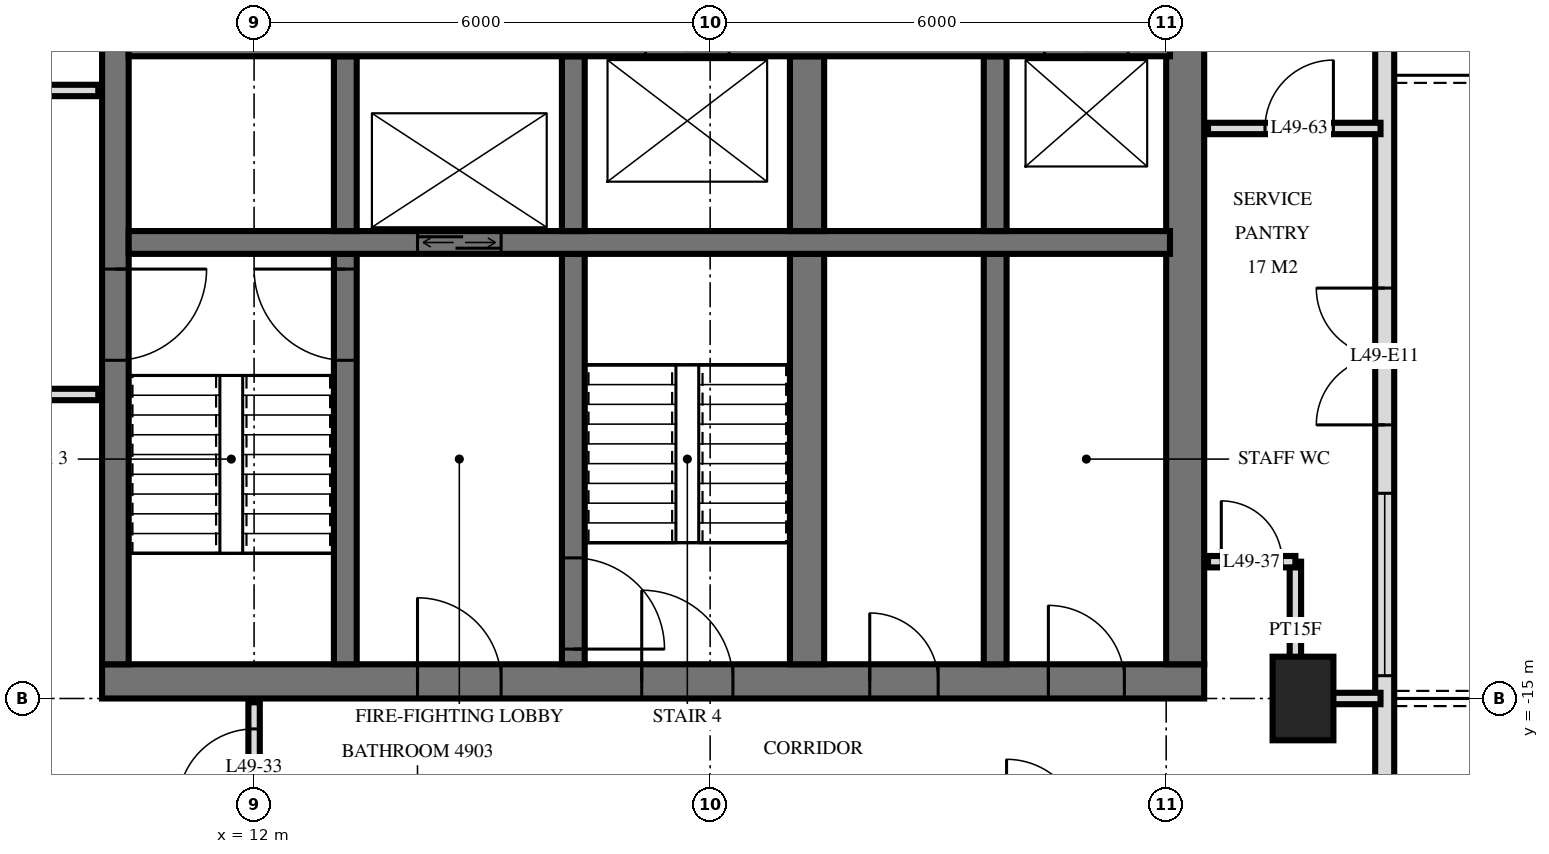
"""IFC4 building model, lengths in metres.
Left out: names, types, materials, properties, quantities, classifications, styles, units other than length and angle.
Written with IfcOpenShell. Run it as: python <this file> out.ifc"""

import sys

from ifc_helpers import new_model, si_unit, direction, frame, frame_2d, origin, origin_2d, place, context, subcontext, project, spatial, rectangle, extrude, element, fill, save


model = new_model("IFC4")
c1 = context("Model", 3, precision=1e-05, world=origin(), true_north=direction((0.0, 1.0)))
c2 = subcontext(c1, "Body", "Model", "MODEL_VIEW")
j1 = project(units=[si_unit("LENGTHUNIT", "METRE"), si_unit("PLANEANGLEUNIT", "RADIAN")], contexts=[c1])
p1 = place(None, origin())
s1 = spatial("IfcSite", under=j1, at=p1, CompositionType="ELEMENT")
p2 = place(p1, origin())
s2 = spatial("IfcBuilding", under=s1, at=p2, CompositionType="ELEMENT")
p3 = place(p2, frame((0.0, 0.0, 190.6)))
s3 = spatial("IfcBuildingStorey", under=s2, at=p3, CompositionType="ELEMENT", Elevation=190.6)
p4 = place(p3, frame((25.8, -15.0, 0.0), z_axis=(0.0, 0.0, 1.0), x_axis=(0.0, 1.0, 0.0)))
e1 = element("IfcColumn", 1, at=p4, inside=s3, PredefinedType="COLUMN", context=c2, shape_type="SweptSolid", body=[
    extrude(rectangle(XDim=1.1, YDim=0.8, at=origin_2d()), origin(), (0.0, 0.0, 1.0), 3.5),
])
p5 = place(p3, frame((10.0, -14.775, 0.0), z_axis=(0.0, 0.0, 1.0), x_axis=(1.0, 0.0, 0.0)))
e2 = element("IfcWall", 2, at=p5, inside=s3, PredefinedType="SHEAR", context=c2, shape_type="SweptSolid", body=[
    extrude(rectangle(XDim=14.5, YDim=0.45, at=frame_2d((7.25, 0.0))), origin(), (0.0, 0.0, 1.0), 3.5),
])
p6 = place(p5, frame((7.1, 0.0, 0.0)))
e3 = element("IfcOpeningElement", 3, at=p6, cuts=e2, PredefinedType="OPENING", context=c2, shape_type="SweptSolid", body=[
    extrude(rectangle(XDim=1.2, YDim=2.1, at=frame_2d((0.6, 1.05))), frame((0.0, 0.235, 0.0), z_axis=(0.0, -1.0, 0.0), x_axis=(1.0, 0.0, 0.0)), (0.0, 0.0, 1.0), 0.47),
])
p7 = place(p5, frame((4.15, 0.0, 0.0)))
e4 = element("IfcOpeningElement", 4, at=p7, cuts=e2, PredefinedType="OPENING", context=c2, shape_type="SweptSolid", body=[
    extrude(rectangle(XDim=1.1, YDim=2.1, at=frame_2d((0.55, 1.05))), frame((0.0, 0.235, 0.0), z_axis=(0.0, -1.0, 0.0), x_axis=(1.0, 0.0, 0.0)), (0.0, 0.0, 1.0), 0.47),
])
p8 = place(p5, frame((10.1, 0.0, 0.0)))
e5 = element("IfcOpeningElement", 5, at=p8, cuts=e2, PredefinedType="OPENING", context=c2, shape_type="SweptSolid", body=[
    extrude(rectangle(XDim=0.9, YDim=2.1, at=frame_2d((0.45, 1.05))), frame((0.0, 0.235, 0.0), z_axis=(0.0, -1.0, 0.0), x_axis=(1.0, 0.0, 0.0)), (0.0, 0.0, 1.0), 0.47),
])
p9 = place(p5, frame((12.45, 0.0, 0.0)))
e6 = element("IfcOpeningElement", 6, at=p9, cuts=e2, PredefinedType="OPENING", context=c2, shape_type="SweptSolid", body=[
    extrude(rectangle(XDim=1.0, YDim=2.1, at=frame_2d((0.5, 1.05))), frame((0.0, 0.235, 0.0), z_axis=(0.0, -1.0, 0.0), x_axis=(1.0, 0.0, 0.0)), (0.0, 0.0, 1.0), 0.47),
])
p10 = place(p3, frame((10.175, -14.55, 0.0), z_axis=(0.0, 0.0, 1.0), x_axis=(0.0, 1.0, 0.0)))
e7 = element("IfcWall", 7, at=p10, inside=s3, PredefinedType="SHEAR", context=c2, shape_type="SweptSolid", body=[
    extrude(rectangle(XDim=14.1, YDim=0.35, at=frame_2d((7.05, 0.0))), origin(), (0.0, 0.0, 1.0), 3.5),
])
p11 = place(p10, frame((8.4, 0.0, 0.0)))
e8 = element("IfcOpeningElement", 8, at=p11, cuts=e7, PredefinedType="OPENING", context=c2, shape_type="SweptSolid", body=[
    extrude(rectangle(XDim=1.4, YDim=2.4, at=frame_2d((0.7, 1.2))), frame((0.0, 0.185, 0.0), z_axis=(0.0, -1.0, 0.0), x_axis=(1.0, 0.0, 0.0)), (0.0, 0.0, 1.0), 0.37),
])
p12 = place(p10, frame((10.0, 0.0, 0.0)))
e9 = element("IfcOpeningElement", 9, at=p12, cuts=e7, PredefinedType="OPENING", context=c2, shape_type="SweptSolid", body=[
    extrude(rectangle(XDim=1.4, YDim=2.4, at=frame_2d((0.7, 1.2))), frame((0.0, 0.185, 0.0), z_axis=(0.0, -1.0, 0.0), x_axis=(1.0, 0.0, 0.0)), (0.0, 0.0, 1.0), 0.37),
])
p13 = place(p10, frame((4.0, 0.0, 0.0)))
e10 = element("IfcOpeningElement", 10, at=p13, cuts=e7, PredefinedType="OPENING", context=c2, shape_type="SweptSolid", body=[
    extrude(rectangle(XDim=1.2, YDim=2.1, at=frame_2d((0.6, 1.05))), frame((0.0, 0.185, 0.0), z_axis=(0.0, -1.0, 0.0), x_axis=(1.0, 0.0, 0.0)), (0.0, 0.0, 1.0), 0.37),
])
p14 = place(p3, frame((24.25, -14.55, 0.0), z_axis=(0.0, 0.0, 1.0), x_axis=(0.0, 1.0, 0.0)))
e11 = element("IfcWall", 11, at=p14, inside=s3, PredefinedType="SHEAR", context=c2, shape_type="SweptSolid", body=[
    extrude(rectangle(XDim=14.1, YDim=0.5, at=frame_2d((7.05, 0.0))), origin(), (0.0, 0.0, 1.0), 3.5),
])
p15 = place(p3, frame((10.35, -6.4, 0.0), z_axis=(0.0, 0.0, 1.0), x_axis=(1.0, 0.0, 0.0)))
e12 = element("IfcWall", 12, at=p15, inside=s3, PredefinedType="SHEAR", context=c2, shape_type="SweptSolid", body=[
    extrude(rectangle(XDim=13.7, YDim=0.3, at=frame_2d((6.85, 0.0))), origin(), (0.0, 0.0, 1.0), 3.5),
])
p16 = place(p15, frame((12.05, 0.0, 0.0)))
e13 = element("IfcOpeningElement", 13, at=p16, cuts=e12, PredefinedType="OPENING", context=c2, shape_type="SweptSolid", body=[
    extrude(rectangle(XDim=1.1, YDim=2.1, at=frame_2d((0.55, 1.05))), frame((0.0, 0.16, 0.0), z_axis=(0.0, -1.0, 0.0), x_axis=(1.0, 0.0, 0.0)), (0.0, 0.0, 1.0), 0.32),
])
p17 = place(p15, frame((6.8, 0.0, 0.0)))
e14 = element("IfcOpeningElement", 14, at=p17, cuts=e12, PredefinedType="OPENING", context=c2, shape_type="SweptSolid", body=[
    extrude(rectangle(XDim=1.1, YDim=2.1, at=frame_2d((0.55, 1.05))), frame((0.0, 0.16, 0.0), z_axis=(0.0, -1.0, 0.0), x_axis=(1.0, 0.0, 0.0)), (0.0, 0.0, 1.0), 0.32),
])
p18 = place(p3, frame((10.35, -9.0, 0.0), z_axis=(0.0, 0.0, 1.0), x_axis=(1.0, 0.0, 0.0)))
e15 = element("IfcWall", 15, at=p18, inside=s3, PredefinedType="SHEAR", context=c2, shape_type="SweptSolid", body=[
    extrude(rectangle(XDim=13.7, YDim=0.3, at=frame_2d((6.85, 0.0))), origin(), (0.0, 0.0, 1.0), 3.5),
])
p19 = place(p18, frame((3.8, 0.0, 0.0)))
e16 = element("IfcOpeningElement", 16, at=p19, cuts=e15, PredefinedType="OPENING", context=c2, shape_type="SweptSolid", body=[
    extrude(rectangle(XDim=1.1, YDim=2.1, at=frame_2d((0.55, 1.05))), frame((0.0, 0.16, 0.0), z_axis=(0.0, -1.0, 0.0), x_axis=(1.0, 0.0, 0.0)), (0.0, 0.0, 1.0), 0.32),
])
p20 = place(p3, frame((13.2, -8.85, 0.0), z_axis=(0.0, 0.0, 1.0), x_axis=(0.0, 1.0, 0.0)))
e17 = element("IfcWall", 17, at=p20, inside=s3, PredefinedType="SHEAR", context=c2, shape_type="SweptSolid", body=[
    extrude(rectangle(XDim=2.3, YDim=0.3, at=frame_2d((1.15, 0.0))), origin(), (0.0, 0.0, 1.0), 3.5),
])
p21 = place(p3, frame((13.2, -14.55, 0.0), z_axis=(0.0, 0.0, 1.0), x_axis=(0.0, 1.0, 0.0)))
e18 = element("IfcWall", 18, at=p21, inside=s3, PredefinedType="SHEAR", context=c2, shape_type="SweptSolid", body=[
    extrude(rectangle(XDim=5.4, YDim=0.3, at=frame_2d((2.7, 0.0))), origin(), (0.0, 0.0, 1.0), 3.5),
])
p22 = place(p21, frame((4.0, 0.0, 0.0)))
e19 = element("IfcOpeningElement", 19, at=p22, cuts=e18, PredefinedType="OPENING", context=c2, shape_type="SweptSolid", body=[
    extrude(rectangle(XDim=1.2, YDim=2.1, at=frame_2d((0.6, 1.05))), frame((0.0, 0.16, 0.0), z_axis=(0.0, -1.0, 0.0), x_axis=(1.0, 0.0, 0.0)), (0.0, 0.0, 1.0), 0.32),
])
p23 = place(p3, frame((16.2, -8.85, 0.0), z_axis=(0.0, 0.0, 1.0), x_axis=(0.0, 1.0, 0.0)))
e20 = element("IfcWall", 20, at=p23, inside=s3, PredefinedType="SHEAR", context=c2, shape_type="SweptSolid", body=[
    extrude(rectangle(XDim=2.3, YDim=0.3, at=frame_2d((1.15, 0.0))), origin(), (0.0, 0.0, 1.0), 3.5),
])
p24 = place(p3, frame((16.2, -14.55, 0.0), z_axis=(0.0, 0.0, 1.0), x_axis=(0.0, 1.0, 0.0)))
e21 = element("IfcWall", 21, at=p24, inside=s3, PredefinedType="SHEAR", context=c2, shape_type="SweptSolid", body=[
    extrude(rectangle(XDim=5.4, YDim=0.3, at=frame_2d((2.7, 0.0))), origin(), (0.0, 0.0, 1.0), 3.5),
])
p25 = place(p24, frame((0.2, 0.0, 0.0)))
e22 = element("IfcOpeningElement", 22, at=p25, cuts=e21, PredefinedType="OPENING", context=c2, shape_type="SweptSolid", body=[
    extrude(rectangle(XDim=1.2, YDim=2.1, at=frame_2d((0.6, 1.05))), frame((0.0, 0.16, 0.0), z_axis=(0.0, -1.0, 0.0), x_axis=(1.0, 0.0, 0.0)), (0.0, 0.0, 1.0), 0.32),
])
p26 = place(p3, frame((19.275, -8.85, 0.0), z_axis=(0.0, 0.0, 1.0), x_axis=(0.0, 1.0, 0.0)))
e23 = element("IfcWall", 23, at=p26, inside=s3, PredefinedType="SHEAR", context=c2, shape_type="SweptSolid", body=[
    extrude(rectangle(XDim=2.3, YDim=0.45, at=frame_2d((1.15, 0.0))), origin(), (0.0, 0.0, 1.0), 3.5),
])
p27 = place(p3, frame((19.275, -14.55, 0.0), z_axis=(0.0, 0.0, 1.0), x_axis=(0.0, 1.0, 0.0)))
e24 = element("IfcWall", 24, at=p27, inside=s3, PredefinedType="SHEAR", context=c2, shape_type="SweptSolid", body=[
    extrude(rectangle(XDim=5.4, YDim=0.45, at=frame_2d((2.7, 0.0))), origin(), (0.0, 0.0, 1.0), 3.5),
])
p28 = place(p3, frame((21.75, -8.85, 0.0), z_axis=(0.0, 0.0, 1.0), x_axis=(0.0, 1.0, 0.0)))
e25 = element("IfcWall", 25, at=p28, inside=s3, PredefinedType="SHEAR", context=c2, shape_type="SweptSolid", body=[
    extrude(rectangle(XDim=2.3, YDim=0.3, at=frame_2d((1.15, 0.0))), origin(), (0.0, 0.0, 1.0), 3.5),
])
p29 = place(p3, frame((21.75, -14.55, 0.0), z_axis=(0.0, 0.0, 1.0), x_axis=(0.0, 1.0, 0.0)))
e26 = element("IfcWall", 26, at=p29, inside=s3, PredefinedType="SHEAR", context=c2, shape_type="SweptSolid", body=[
    extrude(rectangle(XDim=5.4, YDim=0.3, at=frame_2d((2.7, 0.0))), origin(), (0.0, 0.0, 1.0), 3.5),
])
p30 = place(p3, frame((26.875, -24.875, 0.0), z_axis=(0.0, 0.0, 1.0), x_axis=(0.0, 1.0, 0.0)))
e27 = element("IfcWall", 27, at=p30, inside=s3, PredefinedType="SOLIDWALL", context=c2, shape_type="SweptSolid", body=[
    extrude(rectangle(XDim=21.551, YDim=0.25, at=frame_2d((10.775, 0.0))), origin(), (0.0, 0.0, 1.0), 3.22),
])
p31 = place(p30, frame((0.575, 0.0, 0.0)))
e28 = element("IfcOpeningElement", 28, at=p31, cuts=e27, PredefinedType="OPENING", context=c2, shape_type="SweptSolid", body=[
    extrude(rectangle(XDim=1.8, YDim=2.4, at=frame_2d((0.9, 1.2))), frame((0.0, 0.135, 0.0), z_axis=(0.0, -1.0, 0.0), x_axis=(1.0, 0.0, 0.0)), (0.0, 0.0, 1.0), 0.27),
])
p32 = place(p30, frame((5.675, 0.0, 0.0)))
e29 = element("IfcOpeningElement", 29, at=p32, cuts=e27, PredefinedType="OPENING", context=c2, shape_type="SweptSolid", body=[
    extrude(rectangle(XDim=1.8, YDim=2.4, at=frame_2d((0.9, 1.2))), frame((0.0, 0.135, 0.0), z_axis=(0.0, -1.0, 0.0), x_axis=(1.0, 0.0, 0.0)), (0.0, 0.0, 1.0), 0.27),
])
p33 = place(p30, frame((10.175, 0.0, 0.9)))
e30 = element("IfcOpeningElement", 30, at=p33, cuts=e27, PredefinedType="OPENING", context=c2, shape_type="SweptSolid", body=[
    extrude(rectangle(XDim=2.4, YDim=1.5, at=frame_2d((1.2, 0.75))), frame((0.0, 0.135, 0.0), z_axis=(0.0, -1.0, 0.0), x_axis=(1.0, 0.0, 0.0)), (0.0, 0.0, 1.0), 0.27),
])
p34 = place(p30, frame((13.475, 0.0, 0.0)))
e31 = element("IfcOpeningElement", 31, at=p34, cuts=e27, PredefinedType="OPENING", context=c2, shape_type="SweptSolid", body=[
    extrude(rectangle(XDim=1.8, YDim=2.4, at=frame_2d((0.9, 1.2))), frame((0.0, 0.135, 0.0), z_axis=(0.0, -1.0, 0.0), x_axis=(1.0, 0.0, 0.0)), (0.0, 0.0, 1.0), 0.27),
])
p35 = place(p3, frame((25.7, -15.0, 0.0), z_axis=(0.0, 0.0, 1.0), x_axis=(0.0, 1.0, 0.0)))
e32 = element("IfcWall", 32, at=p35, inside=s3, PredefinedType="PARTITIONING", context=c2, shape_type="SweptSolid", body=[
    extrude(rectangle(XDim=1.8, YDim=0.15, at=frame_2d((0.9, 0.0))), origin(), (0.0, 0.0, 1.0), 3.22),
])
p36 = place(p3, frame((12.0, -16.8, 0.0), z_axis=(0.0, 0.0, 1.0), x_axis=(0.0, 1.0, 0.0)))
e33 = element("IfcWall", 33, at=p36, inside=s3, PredefinedType="PARTITIONING", context=c2, shape_type="SweptSolid", body=[
    extrude(rectangle(XDim=1.75, YDim=0.15, at=frame_2d((0.875, 0.0))), origin(), (0.0, 0.0, 1.0), 3.22),
])
p37 = place(p36, frame((0.4, 0.0, 0.0)))
e34 = element("IfcOpeningElement", 34, at=p37, cuts=e33, PredefinedType="OPENING", context=c2, shape_type="SweptSolid", body=[
    extrude(rectangle(XDim=1.0, YDim=2.1, at=frame_2d((0.5, 1.05))), frame((0.0, 0.085, 0.0), z_axis=(0.0, -1.0, 0.0), x_axis=(1.0, 0.0, 0.0)), (0.0, 0.0, 1.0), 0.17),
])
p38 = place(p3, frame((25.7, -15.0, 0.0), z_axis=(0.0, 0.0, 1.0), x_axis=(1.0, 0.0, 0.0)))
e35 = element("IfcWall", 35, at=p38, inside=s3, PredefinedType="PARTITIONING", context=c2, shape_type="SweptSolid", body=[
    extrude(rectangle(XDim=1.12, YDim=0.15, at=frame_2d((0.56, 0.0))), origin(), (0.0, 0.0, 1.0), 3.22),
])
p39 = place(p3, frame((24.55, -13.2, 0.0), z_axis=(0.0, 0.0, 1.0), x_axis=(1.0, 0.0, 0.0)))
e36 = element("IfcWall", 36, at=p39, inside=s3, PredefinedType="PARTITIONING", context=c2, shape_type="SweptSolid", body=[
    extrude(rectangle(XDim=1.15, YDim=0.15, at=frame_2d((0.575, 0.0))), origin(), (0.0, 0.0, 1.0), 3.22),
])
p40 = place(p39, frame((0.175, 0.0, 0.0)))
e37 = element("IfcOpeningElement", 37, at=p40, cuts=e36, PredefinedType="OPENING", context=c2, shape_type="SweptSolid", body=[
    extrude(rectangle(XDim=0.8, YDim=2.1, at=frame_2d((0.4, 1.05))), frame((0.0, 0.085, 0.0), z_axis=(0.0, -1.0, 0.0), x_axis=(1.0, 0.0, 0.0)), (0.0, 0.0, 1.0), 0.17),
])
p41 = place(p3, frame((-9.95, -11.0, 0.0), z_axis=(0.0, 0.0, 1.0), x_axis=(1.0, 0.0, 0.0)))
e38 = element("IfcWall", 38, at=p41, inside=s3, PredefinedType="PARTITIONING", context=c2, shape_type="SweptSolid", body=[
    extrude(rectangle(XDim=19.9, YDim=0.15, at=frame_2d((9.95, 0.0))), origin(), (0.0, 0.0, 1.0), 3.22),
])
p42 = place(p41, frame((9.45, 0.0, 0.0)))
e39 = element("IfcOpeningElement", 39, at=p42, cuts=e38, PredefinedType="OPENING", context=c2, shape_type="SweptSolid", body=[
    extrude(rectangle(XDim=1.0, YDim=2.1, at=frame_2d((0.5, 1.05))), frame((0.0, 0.085, 0.0), z_axis=(0.0, -1.0, 0.0), x_axis=(1.0, 0.0, 0.0)), (0.0, 0.0, 1.0), 0.17),
])
p43 = place(p41, frame((15.45, 0.0, 0.0)))
e40 = element("IfcOpeningElement", 40, at=p43, cuts=e38, PredefinedType="OPENING", context=c2, shape_type="SweptSolid", body=[
    extrude(rectangle(XDim=1.0, YDim=2.1, at=frame_2d((0.5, 1.05))), frame((0.0, 0.085, 0.0), z_axis=(0.0, -1.0, 0.0), x_axis=(1.0, 0.0, 0.0)), (0.0, 0.0, 1.0), 0.17),
])
p44 = place(p3, frame((24.55, -7.5, 0.0), z_axis=(0.0, 0.0, 1.0), x_axis=(1.0, 0.0, 0.0)))
e41 = element("IfcWall", 41, at=p44, inside=s3, PredefinedType="PARTITIONING", context=c2, shape_type="SweptSolid", body=[
    extrude(rectangle(XDim=2.27, YDim=0.15, at=frame_2d((1.135, 0.0))), origin(), (0.0, 0.0, 1.0), 3.22),
])
p45 = place(p44, frame((0.75, 0.0, 0.0)))
e42 = element("IfcOpeningElement", 42, at=p45, cuts=e41, PredefinedType="OPENING", context=c2, shape_type="SweptSolid", body=[
    extrude(rectangle(XDim=0.9, YDim=2.1, at=frame_2d((0.45, 1.05))), frame((0.0, 0.085, 0.0), z_axis=(0.0, -1.0, 0.0), x_axis=(1.0, 0.0, 0.0)), (0.0, 0.0, 1.0), 0.17),
])
p46 = place(p3, frame((-9.95, -7.0, 0.0), z_axis=(0.0, 0.0, 1.0), x_axis=(1.0, 0.0, 0.0)))
e43 = element("IfcWall", 43, at=p46, inside=s3, PredefinedType="PARTITIONING", context=c2, shape_type="SweptSolid", body=[
    extrude(rectangle(XDim=19.9, YDim=0.15, at=frame_2d((9.95, 0.0))), origin(), (0.0, 0.0, 1.0), 3.22),
])
p47 = place(p46, frame((9.45, 0.0, 0.0)))
e44 = element("IfcOpeningElement", 44, at=p47, cuts=e43, PredefinedType="OPENING", context=c2, shape_type="SweptSolid", body=[
    extrude(rectangle(XDim=1.0, YDim=2.1, at=frame_2d((0.5, 1.05))), frame((0.0, 0.085, 0.0), z_axis=(0.0, -1.0, 0.0), x_axis=(1.0, 0.0, 0.0)), (0.0, 0.0, 1.0), 0.17),
])
p48 = place(p46, frame((3.45, 0.0, 0.0)))
e45 = element("IfcOpeningElement", 45, at=p48, cuts=e43, PredefinedType="OPENING", context=c2, shape_type="SweptSolid", body=[
    extrude(rectangle(XDim=1.0, YDim=2.1, at=frame_2d((0.5, 1.05))), frame((0.0, 0.085, 0.0), z_axis=(0.0, -1.0, 0.0), x_axis=(1.0, 0.0, 0.0)), (0.0, 0.0, 1.0), 0.17),
])
p49 = place(p33, origin())
e46 = element("IfcWindow", 46, at=p49, inside=s3, PartitioningType="SINGLE_PANEL", PredefinedType="WINDOW", context=c2, shape_type="SweptSolid", body=[
    extrude(rectangle(XDim=2.4, YDim=1.5, at=frame_2d((1.2, 0.75))), frame((0.0, 0.03, 0.0), z_axis=(0.0, -1.0, 0.0), x_axis=(1.0, 0.0, 0.0)), (0.0, 0.0, 1.0), 0.06),
])
fill(e30, e46)
p50 = place(p34, origin())
e47 = element("IfcDoor", 47, at=p50, inside=s3, OperationType="DOUBLE_DOOR_SINGLE_SWING", PredefinedType="DOOR", context=c2, shape_type="SweptSolid", body=[
    extrude(rectangle(XDim=1.8, YDim=2.4, at=frame_2d((0.9, 1.2))), frame((0.0, 0.025, 0.0), z_axis=(0.0, -1.0, 0.0), x_axis=(1.0, 0.0, 0.0)), (0.0, 0.0, 1.0), 0.05),
])
fill(e31, e47)
p51 = place(p19, origin())
e48 = element("IfcDoor", 48, at=p51, inside=s3, OperationType="DOUBLE_DOOR_SLIDING", PredefinedType="USERDEFINED", context=c2, shape_type="SweptSolid", body=[
    extrude(rectangle(XDim=1.1, YDim=2.1, at=frame_2d((0.55, 1.05))), frame((0.0, 0.025, 0.0), z_axis=(0.0, -1.0, 0.0), x_axis=(1.0, 0.0, 0.0)), (0.0, 0.0, 1.0), 0.05),
])
fill(e16, e48)
p52 = place(p13, frame((0.6, 0.0, 0.0), z_axis=(0.0, 0.0, 1.0), x_axis=(-1.0, 0.0, 0.0)))
e49 = element("IfcDoor", 49, at=p52, inside=s3, OperationType="SINGLE_SWING_RIGHT", PredefinedType="DOOR", context=c2, shape_type="SweptSolid", body=[
    extrude(rectangle(XDim=1.2, YDim=2.1, at=frame_2d((0.0, 1.05))), frame((0.0, -0.025, 0.0), z_axis=(0.0, 1.0, 0.0), x_axis=(-1.0, 0.0, 0.0)), (0.0, 0.0, 1.0), 0.05),
])
fill(e10, e49)
p53 = place(p6, origin())
e50 = element("IfcDoor", 50, at=p53, inside=s3, OperationType="SINGLE_SWING_RIGHT", PredefinedType="DOOR", context=c2, shape_type="SweptSolid", body=[
    extrude(rectangle(XDim=1.2, YDim=2.1, at=frame_2d((0.6, 1.05))), frame((0.0, 0.025, 0.0), z_axis=(0.0, -1.0, 0.0), x_axis=(1.0, 0.0, 0.0)), (0.0, 0.0, 1.0), 0.05),
])
fill(e3, e50)
p54 = place(p7, origin())
e51 = element("IfcDoor", 51, at=p54, inside=s3, OperationType="SINGLE_SWING_RIGHT", PredefinedType="DOOR", context=c2, shape_type="SweptSolid", body=[
    extrude(rectangle(XDim=1.1, YDim=2.1, at=frame_2d((0.55, 1.05))), frame((0.0, 0.025, 0.0), z_axis=(0.0, -1.0, 0.0), x_axis=(1.0, 0.0, 0.0)), (0.0, 0.0, 1.0), 0.05),
])
fill(e4, e51)
p55 = place(p8, origin())
e52 = element("IfcDoor", 52, at=p55, inside=s3, OperationType="SINGLE_SWING_RIGHT", PredefinedType="DOOR", context=c2, shape_type="SweptSolid", body=[
    extrude(rectangle(XDim=0.9, YDim=2.1, at=frame_2d((0.45, 1.05))), frame((0.0, 0.025, 0.0), z_axis=(0.0, -1.0, 0.0), x_axis=(1.0, 0.0, 0.0)), (0.0, 0.0, 1.0), 0.05),
])
fill(e5, e52)
p56 = place(p9, origin())
e53 = element("IfcDoor", 53, at=p56, inside=s3, OperationType="SINGLE_SWING_RIGHT", PredefinedType="DOOR", context=c2, shape_type="SweptSolid", body=[
    extrude(rectangle(XDim=1.0, YDim=2.1, at=frame_2d((0.5, 1.05))), frame((0.0, 0.025, 0.0), z_axis=(0.0, -1.0, 0.0), x_axis=(1.0, 0.0, 0.0)), (0.0, 0.0, 1.0), 0.05),
])
fill(e6, e53)
p57 = place(p22, origin())
e54 = element("IfcDoor", 54, at=p57, inside=s3, OperationType="SINGLE_SWING_LEFT", PredefinedType="DOOR", context=c2, shape_type="SweptSolid", body=[
    extrude(rectangle(XDim=1.2, YDim=2.1, at=frame_2d((0.6, 1.05))), frame((0.0, 0.025, 0.0), z_axis=(0.0, -1.0, 0.0), x_axis=(1.0, 0.0, 0.0)), (0.0, 0.0, 1.0), 0.05),
])
fill(e19, e54)
p58 = place(p25, frame((0.6, 0.0, 0.0), z_axis=(0.0, 0.0, 1.0), x_axis=(-1.0, 0.0, 0.0)))
e55 = element("IfcDoor", 55, at=p58, inside=s3, OperationType="SINGLE_SWING_LEFT", PredefinedType="DOOR", context=c2, shape_type="SweptSolid", body=[
    extrude(rectangle(XDim=1.2, YDim=2.1, at=frame_2d((0.0, 1.05))), frame((0.0, -0.025, 0.0), z_axis=(0.0, 1.0, 0.0), x_axis=(-1.0, 0.0, 0.0)), (0.0, 0.0, 1.0), 0.05),
])
fill(e22, e55)
p59 = place(p37, origin())
e56 = element("IfcDoor", 56, at=p59, inside=s3, OperationType="SINGLE_SWING_RIGHT", PredefinedType="DOOR", context=c2, shape_type="SweptSolid", body=[
    extrude(rectangle(XDim=1.0, YDim=2.1, at=frame_2d((0.5, 1.05))), frame((0.0, 0.025, 0.0), z_axis=(0.0, -1.0, 0.0), x_axis=(1.0, 0.0, 0.0)), (0.0, 0.0, 1.0), 0.05),
])
fill(e34, e56)
p60 = place(p40, origin())
e57 = element("IfcDoor", 57, at=p60, inside=s3, OperationType="SINGLE_SWING_RIGHT", PredefinedType="DOOR", context=c2, shape_type="SweptSolid", body=[
    extrude(rectangle(XDim=0.8, YDim=2.1, at=frame_2d((0.4, 1.05))), frame((0.0, 0.025, 0.0), z_axis=(0.0, -1.0, 0.0), x_axis=(1.0, 0.0, 0.0)), (0.0, 0.0, 1.0), 0.05),
])
fill(e37, e57)
p61 = place(p45, origin())
e58 = element("IfcDoor", 58, at=p61, inside=s3, OperationType="SINGLE_SWING_LEFT", PredefinedType="DOOR", context=c2, shape_type="SweptSolid", body=[
    extrude(rectangle(XDim=0.9, YDim=2.1, at=frame_2d((0.45, 1.05))), frame((0.0, 0.025, 0.0), z_axis=(0.0, -1.0, 0.0), x_axis=(1.0, 0.0, 0.0)), (0.0, 0.0, 1.0), 0.05),
])
fill(e42, e58)
save(model, sys.argv[1])
